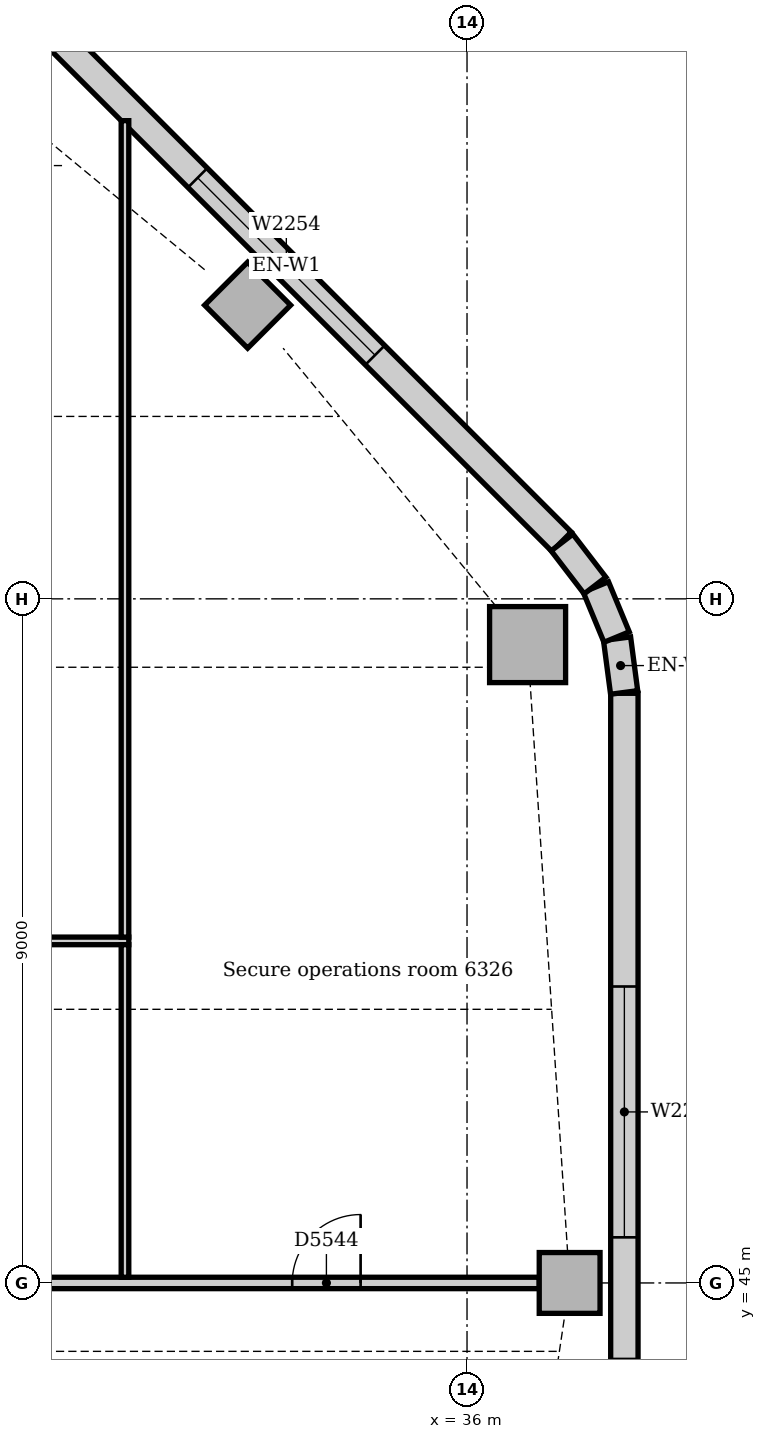
"""IFC4 building model, lengths in metres.
Left out: names, types, materials, properties, quantities, classifications, styles, units other than length and angle.
Written with IfcOpenShell. Run it as: python <this file> out.ifc"""

import sys

from ifc_helpers import new_model, si_unit, direction, frame, frame_2d, origin, origin_2d, place, context, subcontext, project, spatial, rectangle, extrude, element, fill, save


model = new_model("IFC4")
c1 = context("Model", 3, precision=1e-05, world=origin(), true_north=direction((0.0, 1.0)))
c2 = subcontext(c1, "Body", "Model", "MODEL_VIEW")
j1 = project(units=[si_unit("LENGTHUNIT", "METRE"), si_unit("PLANEANGLEUNIT", "RADIAN")], contexts=[c1])
p1 = place(None, origin())
s1 = spatial("IfcSite", under=j1, at=p1, CompositionType="ELEMENT")
p2 = place(p1, origin())
s2 = spatial("IfcBuilding", under=s1, at=p2, CompositionType="ELEMENT")
p3 = place(p2, frame((0.0, 0.0, 263.0)))
s3 = spatial("IfcBuildingStorey", under=s2, at=p3, CompositionType="ELEMENT", Elevation=263.0)
p4 = place(p3, frame((36.797, 53.398, 0.0), z_axis=(0.0, 0.0, 1.0), x_axis=(1.0, 0.0, 0.0)))
e1 = element("IfcColumn", 1, at=p4, inside=s3, PredefinedType="COLUMN", context=c2, shape_type="SweptSolid", body=[
    extrude(rectangle(XDim=1.0, YDim=1.0, at=origin_2d()), origin(), (0.0, 0.0, 1.0), 3.85),
])
for number, where, z_axis, x_axis in (
    (2, (37.35, 45.0, 0.0), (0.0, 0.0, 1.0), (1.0, 0.0, 0.0)),
    (3, (33.114, 57.864, 0.0), (0.0, 0.0, 1.0), (0.707, 0.707, 0.0)),
):
    element("IfcColumn", number, at=place(p3, frame(where, z_axis=z_axis, x_axis=x_axis)), inside=s3, PredefinedType="COLUMN", context=c2, shape_type="SweptSolid", body=[
        extrude(rectangle(XDim=0.8, YDim=0.8, at=origin_2d()), origin(), (0.0, 0.0, 1.0), 3.85),
    ])
p5 = place(p3, frame((38.07, 28.243, 0.0), z_axis=(0.0, 0.0, 1.0), x_axis=(0.0, 1.0, 0.0)))
e4 = element("IfcWall", 4, at=p5, inside=s3, PredefinedType="STANDARD", context=c2, shape_type="SweptSolid", body=[
    extrude(rectangle(XDim=24.515, YDim=0.36, at=frame_2d((12.257, 0.0))), origin(), (0.0, 0.0, 1.0), 3.85),
])
p6 = place(p5, frame((3.857, 0.0, 0.9)))
e5 = element("IfcOpeningElement", 5, at=p6, cuts=e4, PredefinedType="OPENING", context=c2, shape_type="SweptSolid", body=[
    extrude(rectangle(XDim=3.3, YDim=1.6, at=frame_2d((1.65, 0.8))), frame((0.0, 0.19, 0.0), z_axis=(0.0, -1.0, 0.0), x_axis=(1.0, 0.0, 0.0)), (0.0, 0.0, 1.0), 0.38),
])
p7 = place(p5, frame((8.357, 0.0, 0.9)))
e6 = element("IfcOpeningElement", 6, at=p7, cuts=e4, PredefinedType="OPENING", context=c2, shape_type="SweptSolid", body=[
    extrude(rectangle(XDim=3.3, YDim=1.6, at=frame_2d((1.65, 0.8))), frame((0.0, 0.19, 0.0), z_axis=(0.0, -1.0, 0.0), x_axis=(1.0, 0.0, 0.0)), (0.0, 0.0, 1.0), 0.38),
])
p8 = place(p5, frame((13.957, 0.0, 0.9)))
e7 = element("IfcOpeningElement", 7, at=p8, cuts=e4, PredefinedType="OPENING", context=c2, shape_type="SweptSolid", body=[
    extrude(rectangle(XDim=1.8, YDim=1.6, at=frame_2d((0.9, 0.8))), frame((0.0, 0.19, 0.0), z_axis=(0.0, -1.0, 0.0), x_axis=(1.0, 0.0, 0.0)), (0.0, 0.0, 1.0), 0.38),
])
p9 = place(p5, frame((17.357, 0.0, 0.9)))
e8 = element("IfcOpeningElement", 8, at=p9, cuts=e4, PredefinedType="OPENING", context=c2, shape_type="SweptSolid", body=[
    extrude(rectangle(XDim=3.3, YDim=1.6, at=frame_2d((1.65, 0.8))), frame((0.0, 0.19, 0.0), z_axis=(0.0, -1.0, 0.0), x_axis=(1.0, 0.0, 0.0)), (0.0, 0.0, 1.0), 0.38),
])
p10 = place(p3, frame((37.244, 54.751, 0.0), z_axis=(0.0, 0.0, 1.0), x_axis=(-0.707106781187, 0.707106781187, 0.0)))
e9 = element("IfcWall", 9, at=p10, inside=s3, PredefinedType="STANDARD", context=c2, shape_type="SweptSolid", body=[
    extrude(rectangle(XDim=10.243, YDim=0.36, at=frame_2d((5.121, 0.0))), origin(), (0.0, 0.0, 1.0), 3.85),
])
p11 = place(p10, frame((3.471, 0.0, 0.9)))
e10 = element("IfcOpeningElement", 10, at=p11, cuts=e9, PredefinedType="OPENING", context=c2, shape_type="SweptSolid", body=[
    extrude(rectangle(XDim=3.3, YDim=1.6, at=frame_2d((1.65, 0.8))), frame((0.0, 0.19, 0.0), z_axis=(0.0, -1.0, 0.0), x_axis=(1.0, 0.0, 0.0)), (0.0, 0.0, 1.0), 0.38),
])
for number, where, z_axis, x_axis in (
    (11, (38.067, 52.769, 0.0), (0.0, 0.0, 1.0), (-0.131, 0.991, 0.0)),
    (12, (37.968, 53.497, 0.0), (0.0, 0.0, 1.0), (-0.383, 0.924, 0.0)),
):
    element("IfcWall", number, at=place(p3, frame(where, z_axis=z_axis, x_axis=x_axis)), inside=s3, PredefinedType="STANDARD", context=c2, shape_type="SweptSolid", body=[
        extrude(rectangle(XDim=0.713, YDim=0.36, at=frame_2d((0.356, 0.0))), origin(), (0.0, 0.0, 1.0), 3.85),
    ])
p12 = place(p3, frame((37.684, 54.175, 0.0), z_axis=(0.0, 0.0, 1.0), x_axis=(-0.608802368033, 0.793321924995, 0.0)))
e13 = element("IfcWall", 13, at=p12, inside=s3, PredefinedType="STANDARD", context=c2, shape_type="SweptSolid", body=[
    extrude(rectangle(XDim=0.713, YDim=0.36, at=frame_2d((0.357, 0.0))), origin(), (0.0, 0.0, 1.0), 3.85),
])
p13 = place(p3, frame((0.36, 45.0, 0.0), z_axis=(0.0, 0.0, 1.0), x_axis=(1.0, 0.0, 0.0)))
e14 = element("IfcWall", 14, at=p13, inside=s3, PredefinedType="PARTITIONING", context=c2, shape_type="SweptSolid", body=[
    extrude(rectangle(XDim=36.59, YDim=0.15, at=frame_2d((18.295, 0.0))), origin(), (0.0, 0.0, 1.0), 3.85),
])
p14 = place(p13, frame((9.0, 0.0, 0.0)))
e15 = element("IfcOpeningElement", 15, at=p14, cuts=e14, PredefinedType="OPENING", context=c2, shape_type="SweptSolid", body=[
    extrude(rectangle(XDim=1.0, YDim=2.1, at=frame_2d((0.5, 1.05))), frame((0.0, 0.085, 0.0), z_axis=(0.0, -1.0, 0.0), x_axis=(1.0, 0.0, 0.0)), (0.0, 0.0, 1.0), 0.17),
])
p15 = place(p13, frame((23.89, 0.0, 0.0)))
e16 = element("IfcOpeningElement", 16, at=p15, cuts=e14, PredefinedType="OPENING", context=c2, shape_type="SweptSolid", body=[
    extrude(rectangle(XDim=1.0, YDim=2.1, at=frame_2d((0.5, 1.05))), frame((0.0, 0.085, 0.0), z_axis=(0.0, -1.0, 0.0), x_axis=(1.0, 0.0, 0.0)), (0.0, 0.0, 1.0), 0.17),
])
p16 = place(p13, frame((33.34, 0.0, 0.0)))
e17 = element("IfcOpeningElement", 17, at=p16, cuts=e14, PredefinedType="OPENING", context=c2, shape_type="SweptSolid", body=[
    extrude(rectangle(XDim=0.9, YDim=2.1, at=frame_2d((0.45, 1.05))), frame((0.0, 0.085, 0.0), z_axis=(0.0, -1.0, 0.0), x_axis=(1.0, 0.0, 0.0)), (0.0, 0.0, 1.0), 0.17),
])
p17 = place(p3, frame((18.075, 49.5, 0.0), z_axis=(0.0, 0.0, 1.0), x_axis=(1.0, 0.0, 0.0)))
e18 = element("IfcWall", 18, at=p17, inside=s3, PredefinedType="PARTITIONING", context=c2, shape_type="SweptSolid", body=[
    extrude(rectangle(XDim=13.475, YDim=0.1, at=frame_2d((6.737, 0.0))), origin(), (0.0, 0.0, 1.0), 3.85),
])
p18 = place(p17, frame((2.95, 0.0, 0.0)))
e19 = element("IfcOpeningElement", 19, at=p18, cuts=e18, PredefinedType="OPENING", context=c2, shape_type="SweptSolid", body=[
    extrude(rectangle(XDim=0.9, YDim=2.1, at=frame_2d((0.45, 1.05))), frame((0.0, 0.06, 0.0), z_axis=(0.0, -1.0, 0.0), x_axis=(1.0, 0.0, 0.0)), (0.0, 0.0, 1.0), 0.12),
])
p19 = place(p17, frame((9.525, 0.0, 0.0)))
e20 = element("IfcOpeningElement", 20, at=p19, cuts=e18, PredefinedType="OPENING", context=c2, shape_type="SweptSolid", body=[
    extrude(rectangle(XDim=0.9, YDim=2.1, at=frame_2d((0.45, 1.05))), frame((0.0, 0.06, 0.0), z_axis=(0.0, -1.0, 0.0), x_axis=(1.0, 0.0, 0.0)), (0.0, 0.0, 1.0), 0.12),
])
p20 = place(p3, frame((31.5, 45.075, 0.0), z_axis=(0.0, 0.0, 1.0), x_axis=(0.0, 1.0, 0.0)))
e21 = element("IfcWall", 21, at=p20, inside=s3, PredefinedType="PARTITIONING", context=c2, shape_type="SweptSolid", body=[
    extrude(rectangle(XDim=4.375, YDim=0.1, at=frame_2d((2.188, 0.0))), origin(), (0.0, 0.0, 1.0), 3.85),
])
p21 = place(p3, frame((31.5, 49.55, 0.0), z_axis=(0.0, 0.0, 1.0), x_axis=(0.0, 1.0, 0.0)))
e22 = element("IfcWall", 22, at=p21, inside=s3, PredefinedType="PARTITIONING", context=c2, shape_type="SweptSolid", body=[
    extrude(rectangle(XDim=10.741, YDim=0.1, at=frame_2d((5.37, 0.0))), origin(), (0.0, 0.0, 1.0), 3.85),
])
p22 = place(p9, origin())
e23 = element("IfcWindow", 23, at=p22, inside=s3, PartitioningType="SINGLE_PANEL", PredefinedType="WINDOW", context=c2, shape_type="SweptSolid", body=[
    extrude(rectangle(XDim=3.3, YDim=1.6, at=frame_2d((1.65, 0.8))), frame((0.0, 0.13, 0.0), z_axis=(0.0, -1.0, 0.0), x_axis=(1.0, 0.0, 0.0)), (0.0, 0.0, 1.0), 0.06),
])
fill(e8, e23)
p23 = place(p11, origin())
e24 = element("IfcWindow", 24, at=p23, inside=s3, PartitioningType="SINGLE_PANEL", PredefinedType="WINDOW", context=c2, shape_type="SweptSolid", body=[
    extrude(rectangle(XDim=3.3, YDim=1.6, at=frame_2d((1.65, 0.8))), frame((0.0, 0.13, 0.0), z_axis=(0.0, -1.0, 0.0), x_axis=(1.0, 0.0, 0.0)), (0.0, 0.0, 1.0), 0.06),
])
fill(e10, e24)
p24 = place(p16, origin())
e25 = element("IfcDoor", 25, at=p24, inside=s3, OperationType="SINGLE_SWING_RIGHT", PredefinedType="DOOR", context=c2, shape_type="SweptSolid", body=[
    extrude(rectangle(XDim=0.9, YDim=2.1, at=frame_2d((0.45, 1.05))), frame((0.0, 0.025, 0.0), z_axis=(0.0, -1.0, 0.0), x_axis=(1.0, 0.0, 0.0)), (0.0, 0.0, 1.0), 0.05),
])
fill(e17, e25)
save(model, sys.argv[1])
